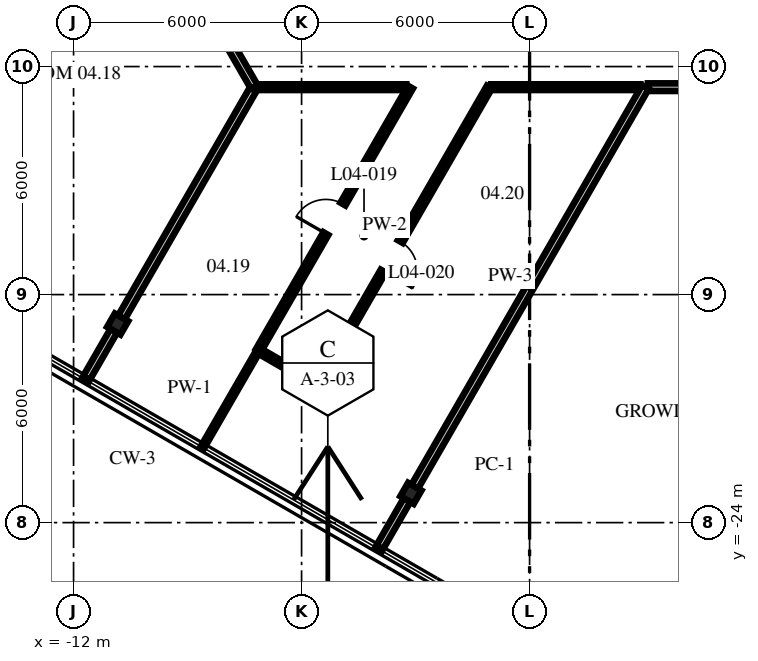
"""IFC4 building model, lengths in metres.
Left out: names, types, materials, properties, quantities, classifications, styles, units other than length and angle.
Written with IfcOpenShell. Run it as: python <this file> out.ifc"""

import sys

from ifc_helpers import new_model, si_unit, direction, frame, frame_2d, origin, origin_2d, place, context, subcontext, project, spatial, rectangle, i_section, extrude, source, transform, mapped, element, fill, save


model = new_model("IFC4")
c1 = context("Model", 3, precision=1e-05, world=origin(), true_north=direction((0.0, 1.0)))
c2 = subcontext(c1, "Body", "Model", "MODEL_VIEW")
j1 = project(units=[si_unit("LENGTHUNIT", "METRE"), si_unit("PLANEANGLEUNIT", "RADIAN")], contexts=[c1])
p1 = place(None, origin())
s1 = spatial("IfcSite", under=j1, at=p1, CompositionType="ELEMENT")
p2 = place(p1, origin())
s2 = spatial("IfcBuilding", under=s1, at=p2, CompositionType="ELEMENT")
p3 = place(p2, frame((0.0, 0.0, 20.3)))
s3 = spatial("IfcBuildingStorey", under=s2, at=p3, CompositionType="ELEMENT", Elevation=20.3)
m1 = source(origin(), c2, "Body", "SweptSolid", [
    extrude(i_section(OverallWidth=0.404, OverallDepth=0.406, WebThickness=0.027, FlangeThickness=0.044, at=origin_2d()), origin(), (0.0, 0.0, 1.0), 4.3),
])
for number, where, z_axis, x_axis in (
    (1, (-10.84, -18.775, 0.0), (0.0, 0.0, 1.0), (0.866, -0.5, 0.0)),
    (2, (-3.124, -23.23, 0.0), (0.0, 0.0, 1.0), (0.866, -0.5, 0.0)),
):
    element("IfcColumn", number, at=place(p3, frame(where, z_axis=z_axis, x_axis=x_axis)), inside=s3, PredefinedType="COLUMN", context=c2, shape_type="MappedRepresentation", body=[
        mapped(m1, transform((0.0, 0.0, 0.0), scale=1.0)),
    ])
m2 = source(origin(), c2, "Body", "SweptSolid", [
    extrude(rectangle(XDim=8.229, YDim=0.2, at=frame_2d((4.115, 0.0))), origin(), (0.0, 0.0, 1.0), 4.1),
])
p4 = place(p3, frame((-11.356, -5.416, 0.0), z_axis=(0.0, 0.0, 1.0), x_axis=(0.500012644715, -0.866018103232, 0.0)))
e3 = element("IfcWall", 3, at=p4, inside=s3, PredefinedType="PARTITIONING", context=c2, shape_type="MappedRepresentation", body=[
    mapped(m2, transform((0.0, 0.0, 0.0), scale=1.0)),
])
m3 = source(origin(), c2, "Body", "SweptSolid", [
    extrude(rectangle(XDim=1.69, YDim=0.15, at=frame_2d((0.845, 0.0))), origin(), (0.0, 0.0, 1.0), 4.1),
])
p5 = place(p3, frame((-7.084, -19.5, 0.0), z_axis=(0.0, 0.0, 1.0), x_axis=(0.866002725405, -0.500039278049, 0.0)))
e4 = element("IfcWall", 4, at=p5, inside=s3, PredefinedType="PARTITIONING", context=c2, shape_type="MappedRepresentation", body=[
    mapped(m3, transform((0.0, 0.0, 0.0), scale=1.0)),
])
m4 = source(origin(), c2, "Body", "SweptSolid", [
    extrude(rectangle(XDim=3.925, YDim=0.15, at=frame_2d((1.962, 0.0))), origin(), (0.0, 0.0, 1.0), 4.1),
])
p6 = place(p3, frame((-7.171, -12.542, 0.0), z_axis=(0.0, 0.0, 1.0), x_axis=(1.0, 0.0, 0.0)))
e5 = element("IfcWall", 5, at=p6, inside=s3, PredefinedType="PARTITIONING", context=c2, shape_type="MappedRepresentation", body=[
    mapped(m4, transform((0.0, 0.0, 0.0), scale=1.0)),
])
m5 = source(origin(), c2, "Body", "SweptSolid", [
    extrude(rectangle(XDim=3.921, YDim=0.15, at=frame_2d((1.961, 0.0))), origin(), (0.0, 0.0, 1.0), 4.1),
])
p7 = place(p3, frame((-1.008, -12.542, 0.0), z_axis=(0.0, 0.0, 1.0), x_axis=(1.0, 0.0, 0.0)))
e6 = element("IfcWall", 6, at=p7, inside=s3, PredefinedType="PARTITIONING", context=c2, shape_type="MappedRepresentation", body=[
    mapped(m5, transform((0.0, 0.0, 0.0), scale=1.0)),
])
m6 = source(origin(), c2, "Body", "SweptSolid", [
    extrude(rectangle(XDim=4.098, YDim=0.2, at=frame_2d((2.049, 0.0))), origin(), (0.0, 0.0, 1.0), 4.1),
])
p8 = place(p3, frame((3.114, -12.542, 0.0), z_axis=(0.0, 0.0, 1.0), x_axis=(1.0, 0.0, 0.0)))
e7 = element("IfcWall", 7, at=p8, inside=s3, PredefinedType="PARTITIONING", context=c2, shape_type="MappedRepresentation", body=[
    mapped(m6, transform((0.0, 0.0, 0.0), scale=1.0)),
])
p9 = place(p8, frame((1.483, 0.0, 0.0)))
e8 = element("IfcOpeningElement", 8, at=p9, cuts=e7, PredefinedType="OPENING", context=c2, shape_type="SweptSolid", body=[
    extrude(rectangle(XDim=1.0, YDim=2.1, at=frame_2d((0.5, 1.05))), frame((0.0, 0.11, 0.0), z_axis=(0.0, -1.0, 0.0), x_axis=(1.0, 0.0, 0.0)), (0.0, 0.0, 1.0), 0.22),
])
m7 = source(origin(), c2, "Body", "SweptSolid", [
    extrude(rectangle(XDim=1.499, YDim=0.2, at=frame_2d((0.75, 0.0))), origin(), (0.0, 0.0, 1.0), 4.1),
])
p10 = place(p3, frame((-3.969, -24.695, 0.0), z_axis=(0.0, 0.0, 1.0), x_axis=(0.499905760005, 0.866079806435, 0.0)))
e9 = element("IfcWall", 9, at=p10, inside=s3, PredefinedType="PARTITIONING", context=c2, shape_type="MappedRepresentation", body=[
    mapped(m7, transform((0.0, 0.0, 0.0), scale=1.0)),
])
m8 = source(origin(), c2, "Body", "SweptSolid", [
    extrude(rectangle(XDim=12.148, YDim=0.2, at=frame_2d((6.074, 0.0))), origin(), (0.0, 0.0, 1.0), 3.343),
])
p11 = place(p3, frame((-3.027, -23.063, 0.0), z_axis=(0.0, 0.0, 1.0), x_axis=(0.499997320042, 0.866026951053, 0.0)))
e10 = element("IfcWall", 10, at=p11, inside=s3, PredefinedType="PARTITIONING", context=c2, shape_type="MappedRepresentation", body=[
    mapped(m8, transform((0.0, 0.0, 0.0), scale=1.0)),
])
m9 = source(origin(), c2, "Body", "SweptSolid", [
    extrude(rectangle(XDim=9.039, YDim=0.15, at=frame_2d((4.519, 0.0))), origin(), (0.0, 0.0, 1.0), 4.1),
])
p12 = place(p3, frame((-5.577, -20.37, 0.0), z_axis=(0.0, 0.0, 1.0), x_axis=(0.499999912267, 0.866025454437, 0.0)))
e11 = element("IfcWall", 11, at=p12, inside=s3, PredefinedType="PARTITIONING", context=c2, shape_type="MappedRepresentation", body=[
    mapped(m9, transform((0.0, 0.0, 0.0), scale=1.0)),
])
p13 = place(p12, frame((3.449, 0.0, 0.0)))
e12 = element("IfcOpeningElement", 12, at=p13, cuts=e11, PredefinedType="OPENING", context=c2, shape_type="SweptSolid", body=[
    extrude(rectangle(XDim=0.9, YDim=2.1, at=frame_2d((0.45, 1.05))), frame((0.0, 0.085, 0.0), z_axis=(0.0, -1.0, 0.0), x_axis=(1.0, 0.0, 0.0)), (0.0, 0.0, 1.0), 0.17),
])
m10 = source(origin(), c2, "Body", "SweptSolid", [
    extrude(rectangle(XDim=2.941, YDim=0.1, at=frame_2d((1.47, 0.0))), origin(), (0.0, 0.0, 1.0), 4.1),
])
p14 = place(p3, frame((-8.607, -22.018, 0.0), z_axis=(0.0, 0.0, 1.0), x_axis=(0.500005104963, 0.866022456413, 0.0)))
e13 = element("IfcWall", 13, at=p14, inside=s3, PredefinedType="PARTITIONING", context=c2, shape_type="MappedRepresentation", body=[
    mapped(m10, transform((0.0, 0.0, 0.0), scale=1.0)),
])
m11 = source(origin(), c2, "Body", "SweptSolid", [
    extrude(rectangle(XDim=8.0, YDim=0.15, at=frame_2d((4.0, 0.0))), origin(), (0.0, 0.0, 1.0), 4.1),
])
p15 = place(p3, frame((-7.136, -19.47, 0.0), z_axis=(0.0, 0.0, 1.0), x_axis=(0.500002489515, 0.866023966458, 0.0)))
e14 = element("IfcWall", 14, at=p15, inside=s3, PredefinedType="PARTITIONING", context=c2, shape_type="MappedRepresentation", body=[
    mapped(m11, transform((0.0, 0.0, 0.0), scale=1.0)),
])
p16 = place(p15, frame((3.549, 0.0, 0.0)))
e15 = element("IfcOpeningElement", 15, at=p16, cuts=e14, PredefinedType="OPENING", context=c2, shape_type="SweptSolid", body=[
    extrude(rectangle(XDim=0.9, YDim=2.1, at=frame_2d((0.45, 1.05))), frame((0.0, 0.085, 0.0), z_axis=(0.0, -1.0, 0.0), x_axis=(1.0, 0.0, 0.0)), (0.0, 0.0, 1.0), 0.17),
])
m12 = source(origin(), c2, "Body", "SweptSolid", [
    extrude(rectangle(XDim=1.499, YDim=0.2, at=frame_2d((0.749, 0.0))), origin(), (0.0, 0.0, 1.0), 4.1),
])
p17 = place(p3, frame((-11.686, -20.24, 0.0), z_axis=(0.0, 0.0, 1.0), x_axis=(0.499976292358, 0.866039090965, 0.0)))
e16 = element("IfcWall", 16, at=p17, inside=s3, PredefinedType="PARTITIONING", context=c2, shape_type="MappedRepresentation", body=[
    mapped(m12, transform((0.0, 0.0, 0.0), scale=1.0)),
])
m13 = source(origin(), c2, "Body", "SweptSolid", [
    extrude(rectangle(XDim=6.934, YDim=0.2, at=frame_2d((3.467, 0.0))), origin(), (0.0, 0.0, 1.0), 3.488),
])
p18 = place(p3, frame((-10.743, -18.608, 0.0), z_axis=(0.0, 0.0, 1.0), x_axis=(0.499986605379, 0.866033137035, 0.0)))
e17 = element("IfcWall", 17, at=p18, inside=s3, PredefinedType="PARTITIONING", context=c2, shape_type="MappedRepresentation", body=[
    mapped(m13, transform((0.0, 0.0, 0.0), scale=1.0)),
])
p19 = place(p16, origin())
e18 = element("IfcDoor", 18, at=p19, inside=s3, OperationType="SINGLE_SWING_LEFT", PredefinedType="DOOR", context=c2, shape_type="SweptSolid", body=[
    extrude(rectangle(XDim=0.9, YDim=2.1, at=frame_2d((0.45, 1.05))), frame((0.0, 0.025, 0.0), z_axis=(0.0, -1.0, 0.0), x_axis=(1.0, 0.0, 0.0)), (0.0, 0.0, 1.0), 0.05),
])
fill(e15, e18)
p20 = place(p13, origin())
e19 = element("IfcDoor", 19, at=p20, inside=s3, OperationType="SINGLE_SWING_RIGHT", PredefinedType="DOOR", context=c2, shape_type="SweptSolid", body=[
    extrude(rectangle(XDim=0.9, YDim=2.1, at=frame_2d((0.45, 1.05))), frame((0.0, 0.025, 0.0), z_axis=(0.0, -1.0, 0.0), x_axis=(1.0, 0.0, 0.0)), (0.0, 0.0, 1.0), 0.05),
])
fill(e12, e19)
save(model, sys.argv[1])
